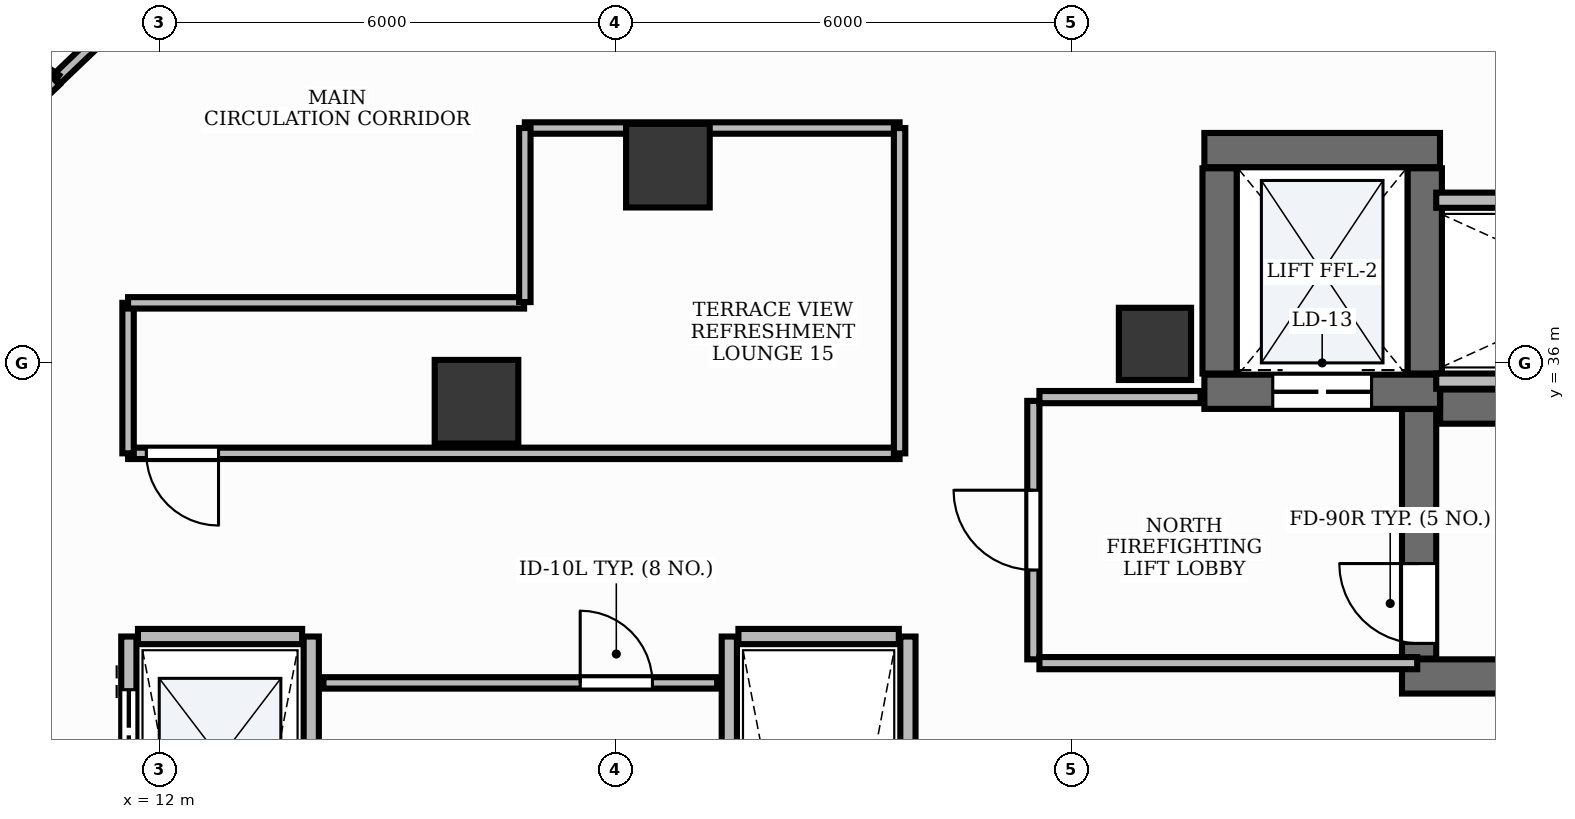
"""IFC4 building model, lengths in metres.
Left out: names, types, materials, properties, quantities, classifications, styles, units other than length and angle.
Written with IfcOpenShell. Run it as: python <this file> out.ifc"""

import sys

from ifc_helpers import new_model, si_unit, direction, frame, frame_2d, origin, origin_2d, place, context, subcontext, project, spatial, rectangle, extrude, element, fill, save


model = new_model("IFC4")
c1 = context("Model", 3, precision=1e-05, world=origin(), true_north=direction((0.0, 1.0)))
c2 = subcontext(c1, "Body", "Model", "MODEL_VIEW")
j1 = project(units=[si_unit("LENGTHUNIT", "METRE"), si_unit("PLANEANGLEUNIT", "RADIAN")], contexts=[c1])
p1 = place(None, origin())
s1 = spatial("IfcSite", under=j1, at=p1, CompositionType="ELEMENT")
p2 = place(p1, origin())
s2 = spatial("IfcBuilding", under=s1, at=p2, CompositionType="ELEMENT")
p3 = place(p2, frame((0.0, 0.0, 34.2)))
s3 = spatial("IfcBuildingStorey", under=s2, at=p3, CompositionType="ELEMENT", Elevation=34.2)
p4 = place(p3, frame((28.852, 35.425, 0.0), z_axis=(0.0, 0.0, 1.0), x_axis=(1.0, 0.0, 0.0)))
e1 = element("IfcWall", 1, at=p4, inside=s3, PredefinedType="SHEAR", context=c2, shape_type="SweptSolid", body=[
    extrude(rectangle(XDim=8.248, YDim=0.45, at=frame_2d((4.124, 0.0))), origin(), (0.0, 0.0, 1.0), 3.9),
])
p5 = place(p3, frame((28.35, 31.875, 0.0), z_axis=(0.0, 0.0, 1.0), x_axis=(1.0, 0.0, 0.0)))
e2 = element("IfcWall", 2, at=p5, inside=s3, PredefinedType="SHEAR", context=c2, shape_type="SweptSolid", body=[
    extrude(rectangle(XDim=8.75, YDim=0.45, at=frame_2d((4.375, 0.0))), origin(), (0.0, 0.0, 1.0), 3.9),
])
p6 = place(p3, frame((28.575, 32.11, 0.0), z_axis=(0.0, 0.0, 1.0), x_axis=(0.0, 1.0, 0.0)))
e3 = element("IfcWall", 3, at=p6, inside=s3, PredefinedType="SHEAR", context=c2, shape_type="SweptSolid", body=[
    extrude(rectangle(XDim=3.283, YDim=0.45, at=frame_2d((1.642, 0.0))), origin(), (0.0, 0.0, 1.0), 3.9),
])
p7 = place(p6, frame((0.2, 0.0, 0.0)))
e4 = element("IfcOpeningElement", 4, at=p7, cuts=e3, PredefinedType="OPENING", context=c2, shape_type="SweptSolid", body=[
    extrude(rectangle(XDim=1.05, YDim=2.15, at=frame_2d((0.525, 1.075))), frame((0.0, 0.24, 0.0), z_axis=(0.0, -1.0, 0.0), x_axis=(1.0, 0.0, 0.0)), (0.0, 0.0, 1.0), 0.48),
])
p8 = place(p3, frame((25.75, 38.8, 0.0), z_axis=(0.0, 0.0, 1.0), x_axis=(1.0, 0.0, 0.0)))
e5 = element("IfcWall", 5, at=p8, inside=s3, PredefinedType="SHEAR", context=c2, shape_type="SweptSolid", body=[
    extrude(rectangle(XDim=3.1, YDim=0.45, at=frame_2d((1.55, 0.0))), origin(), (0.0, 0.0, 1.0), 3.9),
])
p9 = place(p3, frame((25.75, 35.62, 0.0), z_axis=(0.0, 0.0, 1.0), x_axis=(1.0, 0.0, 0.0)))
e6 = element("IfcWall", 6, at=p9, inside=s3, PredefinedType="SHEAR", context=c2, shape_type="SweptSolid", body=[
    extrude(rectangle(XDim=3.1, YDim=0.45, at=frame_2d((1.55, 0.0))), origin(), (0.0, 0.0, 1.0), 3.9),
])
p10 = place(p9, frame((0.9, 0.0, 0.0)))
e7 = element("IfcOpeningElement", 7, at=p10, cuts=e6, PredefinedType="OPENING", context=c2, shape_type="SweptSolid", body=[
    extrude(rectangle(XDim=1.3, YDim=2.2, at=frame_2d((0.65, 1.1))), frame((0.0, 0.24, 0.0), z_axis=(0.0, -1.0, 0.0), x_axis=(1.0, 0.0, 0.0)), (0.0, 0.0, 1.0), 0.48),
])
for number, where, z_axis, x_axis in (
    (8, (25.95, 35.86, 0.0), (0.0, 0.0, 1.0), (0.0, 1.0, 0.0)),
    (9, (28.65, 35.86, 0.0), (0.0, 0.0, 1.0), (0.0, 1.0, 0.0)),
):
    element("IfcWall", number, at=place(p3, frame(where, z_axis=z_axis, x_axis=x_axis)), inside=s3, PredefinedType="SHEAR", context=c2, shape_type="SweptSolid", body=[
        extrude(rectangle(XDim=2.7, YDim=0.45, at=frame_2d((1.35, 0.0))), origin(), (0.0, 0.0, 1.0), 3.9),
    ])
p11 = place(p3, frame((25.1, 36.25, -0.0), z_axis=(0.0, 0.0, 1.0), x_axis=(1.0, 0.0, 0.0)))
e10 = element("IfcColumn", 10, at=p11, inside=s3, PredefinedType="PILASTER", context=c2, shape_type="SweptSolid", body=[
    extrude(rectangle(XDim=0.95, YDim=0.95, at=origin_2d()), origin(), (0.0, 0.0, 1.0), 3.901),
])
for number, where, z_axis, x_axis in (
    (11, (18.692, 38.595, -0.0), (0.0, 0.0, 1.0), (1.0, 0.0, 0.0)),
    (12, (16.174, 35.489, -0.0), (0.0, 0.0, 1.0), (1.0, 0.0, 0.0)),
):
    element("IfcColumn", number, at=place(p3, frame(where, z_axis=z_axis, x_axis=x_axis)), inside=s3, PredefinedType="COLUMN", context=c2, shape_type="SweptSolid", body=[
        extrude(rectangle(XDim=1.1, YDim=1.1, at=origin_2d()), origin(), (0.0, 0.0, 1.0), 3.901),
    ])
p12 = place(p3, frame((11.6, 21.6, 0.0), z_axis=(0.0, 0.0, 1.0), x_axis=(0.0, 1.0, 0.0)))
e13 = element("IfcWall", 13, at=p12, inside=s3, PredefinedType="PARTITIONING", context=c2, shape_type="SweptSolid", body=[
    extrude(rectangle(XDim=10.8, YDim=0.2, at=frame_2d((5.4, 0.0))), origin(), (0.0, 0.0, 1.0), 2.91),
])
p13 = place(p12, frame((0.9, 0.0, 0.0)))
e14 = element("IfcOpeningElement", 14, at=p13, cuts=e13, PredefinedType="OPENING", context=c2, shape_type="SweptSolid", body=[
    extrude(rectangle(XDim=1.1, YDim=2.2, at=frame_2d((0.55, 1.1))), frame((0.0, 0.115, 0.0), z_axis=(0.0, -1.0, 0.0), x_axis=(1.0, 0.0, 0.0)), (0.0, 0.0, 1.0), 0.23),
])
p14 = place(p12, frame((3.6, 0.0, 0.0)))
e15 = element("IfcOpeningElement", 15, at=p14, cuts=e13, PredefinedType="OPENING", context=c2, shape_type="SweptSolid", body=[
    extrude(rectangle(XDim=1.1, YDim=2.2, at=frame_2d((0.55, 1.1))), frame((0.0, 0.115, 0.0), z_axis=(0.0, -1.0, 0.0), x_axis=(1.0, 0.0, 0.0)), (0.0, 0.0, 1.0), 0.23),
])
p15 = place(p12, frame((6.3, 0.0, 0.0)))
e16 = element("IfcOpeningElement", 16, at=p15, cuts=e13, PredefinedType="OPENING", context=c2, shape_type="SweptSolid", body=[
    extrude(rectangle(XDim=1.1, YDim=2.2, at=frame_2d((0.55, 1.1))), frame((0.0, 0.115, 0.0), z_axis=(0.0, -1.0, 0.0), x_axis=(1.0, 0.0, 0.0)), (0.0, 0.0, 1.0), 0.23),
])
p16 = place(p12, frame((9.0, 0.0, 0.0)))
e17 = element("IfcOpeningElement", 17, at=p16, cuts=e13, PredefinedType="OPENING", context=c2, shape_type="SweptSolid", body=[
    extrude(rectangle(XDim=1.1, YDim=2.2, at=frame_2d((0.55, 1.1))), frame((0.0, 0.115, 0.0), z_axis=(0.0, -1.0, 0.0), x_axis=(1.0, 0.0, 0.0)), (0.0, 0.0, 1.0), 0.23),
])
p17 = place(p3, frame((14.0, 21.6, 0.0), z_axis=(0.0, 0.0, 1.0), x_axis=(0.0, 1.0, 0.0)))
e18 = element("IfcWall", 18, at=p17, inside=s3, PredefinedType="PARTITIONING", context=c2, shape_type="SweptSolid", body=[
    extrude(rectangle(XDim=10.8, YDim=0.2, at=frame_2d((5.4, 0.0))), origin(), (0.0, 0.0, 1.0), 2.91),
])
p18 = place(p3, frame((11.72, 32.4, 0.0), z_axis=(0.0, 0.0, 1.0), x_axis=(1.0, 0.0, 0.0)))
e19 = element("IfcWall", 19, at=p18, inside=s3, PredefinedType="PARTITIONING", context=c2, shape_type="SweptSolid", body=[
    extrude(rectangle(XDim=2.16, YDim=0.2, at=frame_2d((1.08, 0.0))), origin(), (0.0, 0.0, 1.0), 2.91),
])
for number, where, z_axis, x_axis in (
    (20, (19.5, 21.6, 0.0), (0.0, 0.0, 1.0), (0.0, 1.0, 0.0)),
    (21, (21.85, 21.6, 0.0), (0.0, 0.0, 1.0), (0.0, 1.0, 0.0)),
):
    element("IfcWall", number, at=place(p3, frame(where, z_axis=z_axis, x_axis=x_axis)), inside=s3, PredefinedType="PARTITIONING", context=c2, shape_type="SweptSolid", body=[
        extrude(rectangle(XDim=10.8, YDim=0.2, at=frame_2d((5.4, 0.0))), origin(), (0.0, 0.0, 1.0), 2.91),
    ])
p19 = place(p3, frame((19.62, 32.4, 0.0), z_axis=(0.0, 0.0, 1.0), x_axis=(1.0, 0.0, 0.0)))
e22 = element("IfcWall", 22, at=p19, inside=s3, PredefinedType="PARTITIONING", context=c2, shape_type="SweptSolid", body=[
    extrude(rectangle(XDim=2.11, YDim=0.2, at=frame_2d((1.055, 0.0))), origin(), (0.0, 0.0, 1.0), 2.91),
])
for number, where, z_axis, x_axis in (
    (23, (28.8, 35.76, 0.0), (0.0, 0.0, 1.0), (1.0, 0.0, 0.0)),
    (24, (28.8, 38.14, 0.0), (0.0, 0.0, 1.0), (1.0, 0.0, 0.0)),
):
    element("IfcWall", number, at=place(p3, frame(where, z_axis=z_axis, x_axis=x_axis)), inside=s3, PredefinedType="PARTITIONING", context=c2, shape_type="SweptSolid", body=[
        extrude(rectangle(XDim=4.57, YDim=0.2, at=frame_2d((2.285, 0.0))), origin(), (0.0, 0.0, 1.0), 2.91),
    ])
p20 = place(p3, frame((23.5, 32.1, 0.0), z_axis=(0.0, 0.0, 1.0), x_axis=(0.0, 1.0, 0.0)))
e25 = element("IfcWall", 25, at=p20, inside=s3, PredefinedType="PARTITIONING", context=c2, shape_type="SweptSolid", body=[
    extrude(rectangle(XDim=3.4, YDim=0.16, at=frame_2d((1.7, 0.0))), origin(), (0.0, 0.0, 1.0), 2.91),
])
p21 = place(p20, frame((1.175, 0.0, 0.0)))
e26 = element("IfcOpeningElement", 26, at=p21, cuts=e25, PredefinedType="OPENING", context=c2, shape_type="SweptSolid", body=[
    extrude(rectangle(XDim=1.05, YDim=2.15, at=frame_2d((0.525, 1.075))), frame((0.0, 0.095, 0.0), z_axis=(0.0, -1.0, 0.0), x_axis=(1.0, 0.0, 0.0)), (0.0, 0.0, 1.0), 0.19),
])
p22 = place(p3, frame((23.58, 32.05, 0.0), z_axis=(0.0, 0.0, 1.0), x_axis=(1.0, 0.0, 0.0)))
e27 = element("IfcWall", 27, at=p22, inside=s3, PredefinedType="PARTITIONING", context=c2, shape_type="SweptSolid", body=[
    extrude(rectangle(XDim=4.97, YDim=0.16, at=frame_2d((2.485, 0.0))), origin(), (0.0, 0.0, 1.0), 2.91),
])
p23 = place(p3, frame((23.58, 35.55, 0.0), z_axis=(0.0, 0.0, 1.0), x_axis=(1.0, 0.0, 0.0)))
e28 = element("IfcWall", 28, at=p23, inside=s3, PredefinedType="PARTITIONING", context=c2, shape_type="SweptSolid", body=[
    extrude(rectangle(XDim=2.12, YDim=0.16, at=frame_2d((1.06, 0.0))), origin(), (0.0, 0.0, 1.0), 2.91),
])
p24 = place(p3, frame((14.16, 31.79, 0.0), z_axis=(0.0, 0.0, 1.0), x_axis=(1.0, 0.0, 0.0)))
e29 = element("IfcWall", 29, at=p24, inside=s3, PredefinedType="PARTITIONING", context=c2, shape_type="SweptSolid", body=[
    extrude(rectangle(XDim=5.18, YDim=0.15, at=frame_2d((2.59, 0.0))), origin(), (0.0, 0.0, 1.0), 2.91),
])
p25 = place(p24, frame((3.378, 0.0, 0.0)))
e30 = element("IfcOpeningElement", 30, at=p25, cuts=e29, PredefinedType="OPENING", context=c2, shape_type="SweptSolid", body=[
    extrude(rectangle(XDim=0.95, YDim=2.15, at=frame_2d((0.475, 1.075))), frame((0.0, 0.09, 0.0), z_axis=(0.0, -1.0, 0.0), x_axis=(1.0, 0.0, 0.0)), (0.0, 0.0, 1.0), 0.18),
])
p26 = place(p3, frame((21.74, 34.81, 0.0), z_axis=(0.0, 0.0, 1.0), x_axis=(-1.0, 0.0, 0.0)))
e31 = element("IfcWall", 31, at=p26, inside=s3, PredefinedType="PARTITIONING", context=c2, shape_type="SweptSolid", body=[
    extrude(rectangle(XDim=10.15, YDim=0.15, at=frame_2d((5.075, 0.0))), origin(), (0.0, 0.0, 1.0), 2.91),
])
p27 = place(p26, frame((8.96, 0.0, 0.0)))
e32 = element("IfcOpeningElement", 32, at=p27, cuts=e31, PredefinedType="OPENING", context=c2, shape_type="SweptSolid", body=[
    extrude(rectangle(XDim=0.95, YDim=2.15, at=frame_2d((0.475, 1.075))), frame((0.0, 0.09, 0.0), z_axis=(0.0, -1.0, 0.0), x_axis=(1.0, 0.0, 0.0)), (0.0, 0.0, 1.0), 0.18),
])
p28 = place(p3, frame((11.693, 40.727, 0.0), z_axis=(0.0, 0.0, 1.0), x_axis=(-0.723614682185, -0.690204166697, 0.0)))
e33 = element("IfcWall", 33, at=p28, inside=s3, PredefinedType="PARTITIONING", context=c2, shape_type="SweptSolid", body=[
    extrude(rectangle(XDim=1.454, YDim=0.15, at=frame_2d((0.727, 0.0))), origin(), (0.0, 0.0, 1.0), 2.91),
])
p29 = place(p3, frame((10.641, 39.723, 0.0), z_axis=(0.0, 0.0, 1.0), x_axis=(-0.821561492386, 0.570119912149, 0.0)))
e34 = element("IfcWall", 34, at=p29, inside=s3, PredefinedType="PARTITIONING", context=c2, shape_type="SweptSolid", body=[
    extrude(rectangle(XDim=2.455, YDim=0.15, at=frame_2d((1.227, 0.0))), origin(), (0.0, 0.0, 1.0), 2.91),
])
p30 = place(p3, frame((16.81, 39.09, 0.0), z_axis=(0.0, 0.0, 1.0), x_axis=(1.0, 0.0, 0.0)))
e35 = element("IfcWall", 35, at=p30, inside=s3, PredefinedType="PARTITIONING", context=c2, shape_type="SweptSolid", body=[
    extrude(rectangle(XDim=4.93, YDim=0.15, at=frame_2d((2.465, 0.0))), origin(), (0.0, 0.0, 1.0), 2.91),
])
p31 = place(p3, frame((21.74, 39.09, 0.0), z_axis=(0.0, 0.0, 1.0), x_axis=(0.0, -1.0, 0.0)))
e36 = element("IfcWall", 36, at=p31, inside=s3, PredefinedType="PARTITIONING", context=c2, shape_type="SweptSolid", body=[
    extrude(rectangle(XDim=4.28, YDim=0.15, at=frame_2d((2.14, 0.0))), origin(), (0.0, 0.0, 1.0), 2.91),
])
p32 = place(p3, frame((11.59, 34.81, 0.0), z_axis=(0.0, 0.0, 1.0), x_axis=(0.0, 1.0, 0.0)))
e37 = element("IfcWall", 37, at=p32, inside=s3, PredefinedType="PARTITIONING", context=c2, shape_type="SweptSolid", body=[
    extrude(rectangle(XDim=1.98, YDim=0.15, at=frame_2d((0.99, 0.0))), origin(), (0.0, 0.0, 1.0), 2.91),
])
p33 = place(p3, frame((11.59, 36.79, 0.0), z_axis=(0.0, 0.0, 1.0), x_axis=(1.0, 0.0, 0.0)))
e38 = element("IfcWall", 38, at=p33, inside=s3, PredefinedType="PARTITIONING", context=c2, shape_type="SweptSolid", body=[
    extrude(rectangle(XDim=5.21, YDim=0.15, at=frame_2d((2.605, 0.0))), origin(), (0.0, 0.0, 1.0), 2.91),
])
p34 = place(p3, frame((16.81, 36.8, 0.0), z_axis=(0.0, 0.0, 1.0), x_axis=(0.0, 1.0, 0.0)))
e39 = element("IfcWall", 39, at=p34, inside=s3, PredefinedType="PARTITIONING", context=c2, shape_type="SweptSolid", body=[
    extrude(rectangle(XDim=2.29, YDim=0.15, at=frame_2d((1.145, 0.0))), origin(), (0.0, 0.0, 1.0), 2.91),
])
p35 = place(p3, frame((10.634, 39.717, 0.0), z_axis=(0.0, 0.0, 1.0), x_axis=(-0.723701031319, -0.690113626345, 0.0)))
e40 = element("IfcWall", 40, at=p35, inside=s3, PredefinedType="PARTITIONING", context=c2, shape_type="SweptSolid", body=[
    extrude(rectangle(XDim=1.476, YDim=0.16, at=frame_2d((0.738, 0.0))), origin(), (0.0, 0.0, 1.0), 2.91),
])
p36 = place(p7, origin())
e41 = element("IfcDoor", 41, at=p36, inside=s3, OperationType="SINGLE_SWING_RIGHT", PredefinedType="DOOR", context=c2, shape_type="SweptSolid", body=[
    extrude(rectangle(XDim=1.05, YDim=2.15, at=frame_2d((0.525, 1.075))), frame((0.0, 0.025, 0.0), z_axis=(0.0, -1.0, 0.0), x_axis=(1.0, 0.0, 0.0)), (0.0, 0.0, 1.0), 0.05),
])
fill(e4, e41)
p37 = place(p16, origin())
e42 = element("IfcDoor", 42, at=p37, inside=s3, OperationType="DOUBLE_DOOR_SLIDING", PredefinedType="DOOR", context=c2, shape_type="SweptSolid", body=[
    extrude(rectangle(XDim=1.1, YDim=2.2, at=frame_2d((0.55, 1.1))), frame((0.0, 0.025, 0.0), z_axis=(0.0, -1.0, 0.0), x_axis=(1.0, 0.0, 0.0)), (0.0, 0.0, 1.0), 0.05),
])
fill(e17, e42)
p38 = place(p10, origin())
e43 = element("IfcDoor", 43, at=p38, inside=s3, OperationType="DOUBLE_DOOR_SLIDING", PredefinedType="DOOR", context=c2, shape_type="SweptSolid", body=[
    extrude(rectangle(XDim=1.3, YDim=2.2, at=frame_2d((0.65, 1.1))), frame((0.0, 0.025, 0.0), z_axis=(0.0, -1.0, 0.0), x_axis=(1.0, 0.0, 0.0)), (0.0, 0.0, 1.0), 0.05),
])
fill(e7, e43)
p39 = place(p21, origin())
e44 = element("IfcDoor", 44, at=p39, inside=s3, OperationType="SINGLE_SWING_RIGHT", PredefinedType="DOOR", context=c2, shape_type="SweptSolid", body=[
    extrude(rectangle(XDim=1.05, YDim=2.15, at=frame_2d((0.525, 1.075))), frame((0.0, 0.025, 0.0), z_axis=(0.0, -1.0, 0.0), x_axis=(1.0, 0.0, 0.0)), (0.0, 0.0, 1.0), 0.05),
])
fill(e26, e44)
p40 = place(p25, origin())
e45 = element("IfcDoor", 45, at=p40, inside=s3, OperationType="SINGLE_SWING_LEFT", PredefinedType="DOOR", context=c2, shape_type="SweptSolid", body=[
    extrude(rectangle(XDim=0.95, YDim=2.15, at=frame_2d((0.475, 1.075))), frame((0.0, 0.025, 0.0), z_axis=(0.0, -1.0, 0.0), x_axis=(1.0, 0.0, 0.0)), (0.0, 0.0, 1.0), 0.05),
])
fill(e30, e45)
p41 = place(p27, origin())
e46 = element("IfcDoor", 46, at=p41, inside=s3, OperationType="SINGLE_SWING_LEFT", PredefinedType="DOOR", context=c2, shape_type="SweptSolid", body=[
    extrude(rectangle(XDim=0.95, YDim=2.15, at=frame_2d((0.475, 1.075))), frame((0.0, 0.025, 0.0), z_axis=(0.0, -1.0, 0.0), x_axis=(1.0, 0.0, 0.0)), (0.0, 0.0, 1.0), 0.05),
])
fill(e32, e46)
save(model, sys.argv[1])
